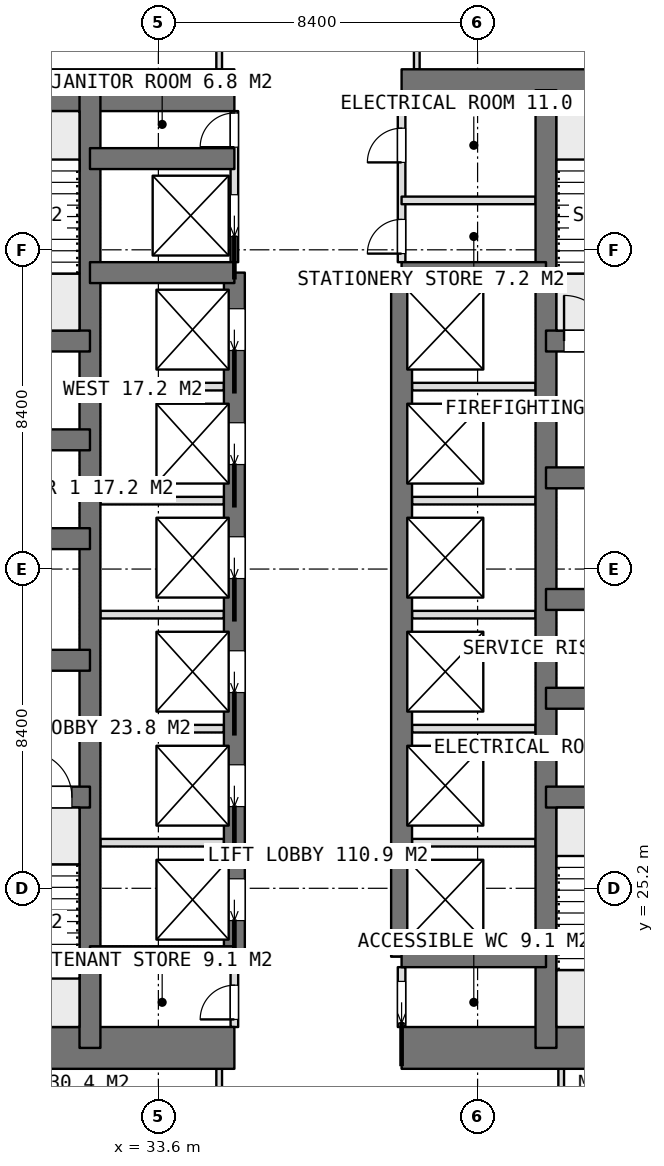
"""IFC4 building model, lengths in metres.
Left out: names, types, materials, properties, quantities, classifications, styles, units other than length and angle.
Written with IfcOpenShell. Run it as: python <this file> out.ifc"""

import sys

from ifc_helpers import new_model, si_unit, direction, frame, frame_2d, origin, place, context, subcontext, project, spatial, rectangle, extrude, element, fill, save


model = new_model("IFC4")
c1 = context("Model", 3, precision=1e-05, world=origin(), true_north=direction((0.0, 1.0)))
c2 = subcontext(c1, "Body", "Model", "MODEL_VIEW")
j1 = project(units=[si_unit("LENGTHUNIT", "METRE"), si_unit("PLANEANGLEUNIT", "RADIAN")], contexts=[c1])
p1 = place(None, origin())
s1 = spatial("IfcSite", under=j1, at=p1, CompositionType="ELEMENT")
p2 = place(p1, origin())
s2 = spatial("IfcBuilding", under=s1, at=p2, CompositionType="ELEMENT")
p3 = place(p2, frame((0.0, 0.0, 47.9)))
s3 = spatial("IfcBuildingStorey", under=s2, at=p3, CompositionType="ELEMENT", Elevation=47.9)
p4 = place(p3, frame((25.2, 21.0, 0.0), z_axis=(0.0, 0.0, 1.0), x_axis=(1.0, 0.0, 0.0)))
e1 = element("IfcWall", 1, at=p4, inside=s3, PredefinedType="SHEAR", context=c2, shape_type="SweptSolid", body=[
    extrude(rectangle(XDim=10.4, YDim=1.1, at=frame_2d((5.2, 0.0))), origin(), (0.0, 0.0, 1.0), 3.75),
])
p5 = place(p3, frame((40.0, 21.0, 0.0), z_axis=(0.0, 0.0, 1.0), x_axis=(1.0, 0.0, 0.0)))
e2 = element("IfcWall", 2, at=p5, inside=s3, PredefinedType="SHEAR", context=c2, shape_type="SweptSolid", body=[
    extrude(rectangle(XDim=10.4, YDim=1.1, at=frame_2d((5.2, 0.0))), origin(), (0.0, 0.0, 1.0), 3.75),
])
p6 = place(p3, frame((25.2, 46.2, 0.0), z_axis=(0.0, 0.0, 1.0), x_axis=(1.0, 0.0, 0.0)))
e3 = element("IfcWall", 3, at=p6, inside=s3, PredefinedType="SHEAR", context=c2, shape_type="SweptSolid", body=[
    extrude(rectangle(XDim=10.4, YDim=1.1, at=frame_2d((5.2, 0.0))), origin(), (0.0, 0.0, 1.0), 3.75),
])
p7 = place(p3, frame((40.0, 46.2, 0.0), z_axis=(0.0, 0.0, 1.0), x_axis=(1.0, 0.0, 0.0)))
e4 = element("IfcWall", 4, at=p7, inside=s3, PredefinedType="SHEAR", context=c2, shape_type="SweptSolid", body=[
    extrude(rectangle(XDim=10.4, YDim=1.1, at=frame_2d((5.2, 0.0))), origin(), (0.0, 0.0, 1.0), 3.75),
])
for number, where, z_axis, x_axis in (
    (5, (31.8, 21.0, 0.0), (0.0, 0.0, 1.0), (0.0, 1.0, 0.0)),
    (6, (43.8, 21.0, 0.0), (0.0, 0.0, 1.0), (0.0, 1.0, 0.0)),
):
    element("IfcWall", number, at=place(p3, frame(where, z_axis=z_axis, x_axis=x_axis)), inside=s3, PredefinedType="SHEAR", context=c2, shape_type="SweptSolid", body=[
        extrude(rectangle(XDim=25.2, YDim=0.55, at=frame_2d((12.6, 0.0))), origin(), (0.0, 0.0, 1.0), 3.75),
    ])
p8 = place(p3, frame((35.6, 23.4, 0.0), z_axis=(0.0, 0.0, 1.0), x_axis=(0.0, 1.0, 0.0)))
e7 = element("IfcWall", 7, at=p8, inside=s3, PredefinedType="SHEAR", context=c2, shape_type="SweptSolid", body=[
    extrude(rectangle(XDim=18.0, YDim=0.55, at=frame_2d((9.0, 0.0))), origin(), (0.0, 0.0, 1.0), 3.75),
])
p9 = place(p8, frame((0.95, 0.0, 0.0)))
e8 = element("IfcOpeningElement", 8, at=p9, cuts=e7, PredefinedType="OPENING", context=c2, shape_type="SweptSolid", body=[
    extrude(rectangle(XDim=1.1, YDim=2.1, at=frame_2d((0.55, 1.05))), frame((0.0, 0.285, 0.0), z_axis=(0.0, -1.0, 0.0), x_axis=(1.0, 0.0, 0.0)), (0.0, 0.0, 1.0), 0.57),
])
p10 = place(p8, frame((3.95, 0.0, 0.0)))
e9 = element("IfcOpeningElement", 9, at=p10, cuts=e7, PredefinedType="OPENING", context=c2, shape_type="SweptSolid", body=[
    extrude(rectangle(XDim=1.1, YDim=2.1, at=frame_2d((0.55, 1.05))), frame((0.0, 0.285, 0.0), z_axis=(0.0, -1.0, 0.0), x_axis=(1.0, 0.0, 0.0)), (0.0, 0.0, 1.0), 0.57),
])
p11 = place(p8, frame((6.95, 0.0, 0.0)))
e10 = element("IfcOpeningElement", 10, at=p11, cuts=e7, PredefinedType="OPENING", context=c2, shape_type="SweptSolid", body=[
    extrude(rectangle(XDim=1.1, YDim=2.1, at=frame_2d((0.55, 1.05))), frame((0.0, 0.285, 0.0), z_axis=(0.0, -1.0, 0.0), x_axis=(1.0, 0.0, 0.0)), (0.0, 0.0, 1.0), 0.57),
])
p12 = place(p8, frame((9.95, 0.0, 0.0)))
e11 = element("IfcOpeningElement", 11, at=p12, cuts=e7, PredefinedType="OPENING", context=c2, shape_type="SweptSolid", body=[
    extrude(rectangle(XDim=1.1, YDim=2.1, at=frame_2d((0.55, 1.05))), frame((0.0, 0.285, 0.0), z_axis=(0.0, -1.0, 0.0), x_axis=(1.0, 0.0, 0.0)), (0.0, 0.0, 1.0), 0.57),
])
p13 = place(p8, frame((12.95, 0.0, 0.0)))
e12 = element("IfcOpeningElement", 12, at=p13, cuts=e7, PredefinedType="OPENING", context=c2, shape_type="SweptSolid", body=[
    extrude(rectangle(XDim=1.1, YDim=2.1, at=frame_2d((0.55, 1.05))), frame((0.0, 0.285, 0.0), z_axis=(0.0, -1.0, 0.0), x_axis=(1.0, 0.0, 0.0)), (0.0, 0.0, 1.0), 0.57),
])
p14 = place(p8, frame((15.95, 0.0, 0.0)))
e13 = element("IfcOpeningElement", 13, at=p14, cuts=e7, PredefinedType="OPENING", context=c2, shape_type="SweptSolid", body=[
    extrude(rectangle(XDim=1.1, YDim=2.1, at=frame_2d((0.55, 1.05))), frame((0.0, 0.285, 0.0), z_axis=(0.0, -1.0, 0.0), x_axis=(1.0, 0.0, 0.0)), (0.0, 0.0, 1.0), 0.57),
])
p15 = place(p3, frame((40.0, 23.4, 0.0), z_axis=(0.0, 0.0, 1.0), x_axis=(0.0, 1.0, 0.0)))
e14 = element("IfcWall", 14, at=p15, inside=s3, PredefinedType="SHEAR", context=c2, shape_type="SweptSolid", body=[
    extrude(rectangle(XDim=18.0, YDim=0.55, at=frame_2d((9.0, 0.0))), origin(), (0.0, 0.0, 1.0), 3.75),
])
for number, where, z_axis, x_axis in (
    (15, (31.8, 23.4, 0.0), (0.0, 0.0, 1.0), (1.0, 0.0, 0.0)),
    (16, (31.8, 41.4, 0.0), (0.0, 0.0, 1.0), (1.0, 0.0, 0.0)),
    (17, (31.8, 44.4, 0.0), (0.0, 0.0, 1.0), (1.0, 0.0, 0.0)),
    (18, (40.0, 23.4, 0.0), (0.0, 0.0, 1.0), (1.0, 0.0, 0.0)),
    (19, (40.0, 41.4, 0.0), (0.0, 0.0, 1.0), (1.0, 0.0, 0.0)),
):
    element("IfcWall", number, at=place(p3, frame(where, z_axis=z_axis, x_axis=x_axis)), inside=s3, PredefinedType="SHEAR", context=c2, shape_type="SweptSolid", body=[
        extrude(rectangle(XDim=3.8, YDim=0.55, at=frame_2d((1.9, 0.0))), origin(), (0.0, 0.0, 1.0), 3.75),
    ])
p16 = place(p3, frame((25.2, 27.6, 0.0), z_axis=(0.0, 0.0, 1.0), x_axis=(1.0, 0.0, 0.0)))
e20 = element("IfcWall", 20, at=p16, inside=s3, PredefinedType="SHEAR", context=c2, shape_type="SweptSolid", body=[
    extrude(rectangle(XDim=6.6, YDim=0.55, at=frame_2d((3.3, 0.0))), origin(), (0.0, 0.0, 1.0), 3.75),
])
p17 = place(p16, frame((4.925, 0.0, 0.0)))
e21 = element("IfcOpeningElement", 21, at=p17, cuts=e20, PredefinedType="OPENING", context=c2, shape_type="SweptSolid", body=[
    extrude(rectangle(XDim=1.2, YDim=2.1, at=frame_2d((0.6, 1.05))), frame((0.0, 0.285, 0.0), z_axis=(0.0, -1.0, 0.0), x_axis=(1.0, 0.0, 0.0)), (0.0, 0.0, 1.0), 0.57),
])
p18 = place(p3, frame((25.2, 31.2, 0.0), z_axis=(0.0, 0.0, 1.0), x_axis=(1.0, 0.0, 0.0)))
e22 = element("IfcWall", 22, at=p18, inside=s3, PredefinedType="SHEAR", context=c2, shape_type="SweptSolid", body=[
    extrude(rectangle(XDim=6.6, YDim=0.55, at=frame_2d((3.3, 0.0))), origin(), (0.0, 0.0, 1.0), 3.75),
])
p19 = place(p18, frame((2.65, 0.0, 0.0)))
e23 = element("IfcOpeningElement", 23, at=p19, cuts=e22, PredefinedType="OPENING", context=c2, shape_type="SweptSolid", body=[
    extrude(rectangle(XDim=1.3, YDim=2.1, at=frame_2d((0.65, 1.05))), frame((0.0, 0.285, 0.0), z_axis=(0.0, -1.0, 0.0), x_axis=(1.0, 0.0, 0.0)), (0.0, 0.0, 1.0), 0.57),
])
for number, where, z_axis, x_axis in (
    (24, (25.2, 34.4, 0.0), (0.0, 0.0, 1.0), (1.0, 0.0, 0.0)),
    (25, (25.2, 37.0, 0.0), (0.0, 0.0, 1.0), (1.0, 0.0, 0.0)),
    (26, (25.2, 39.6, 0.0), (0.0, 0.0, 1.0), (1.0, 0.0, 0.0)),
):
    element("IfcWall", number, at=place(p3, frame(where, z_axis=z_axis, x_axis=x_axis)), inside=s3, PredefinedType="SHEAR", context=c2, shape_type="SweptSolid", body=[
        extrude(rectangle(XDim=6.6, YDim=0.55, at=frame_2d((3.3, 0.0))), origin(), (0.0, 0.0, 1.0), 3.75),
    ])
for number, where, z_axis, x_axis in (
    (27, (43.8, 27.6, 0.0), (0.0, 0.0, 1.0), (1.0, 0.0, 0.0)),
    (28, (43.8, 30.2, 0.0), (0.0, 0.0, 1.0), (1.0, 0.0, 0.0)),
    (29, (43.8, 32.8, 0.0), (0.0, 0.0, 1.0), (1.0, 0.0, 0.0)),
):
    element("IfcWall", number, at=place(p3, frame(where, z_axis=z_axis, x_axis=x_axis)), inside=s3, PredefinedType="SHEAR", context=c2, shape_type="SweptSolid", body=[
        extrude(rectangle(XDim=6.6, YDim=0.55, at=frame_2d((3.3, 0.0))), origin(), (0.0, 0.0, 1.0), 3.75),
    ])
p20 = place(p3, frame((43.8, 36.0, 0.0), z_axis=(0.0, 0.0, 1.0), x_axis=(1.0, 0.0, 0.0)))
e30 = element("IfcWall", 30, at=p20, inside=s3, PredefinedType="SHEAR", context=c2, shape_type="SweptSolid", body=[
    extrude(rectangle(XDim=6.6, YDim=0.55, at=frame_2d((3.3, 0.0))), origin(), (0.0, 0.0, 1.0), 3.75),
])
p21 = place(p20, frame((2.65, 0.0, 0.0)))
e31 = element("IfcOpeningElement", 31, at=p21, cuts=e30, PredefinedType="OPENING", context=c2, shape_type="SweptSolid", body=[
    extrude(rectangle(XDim=1.3, YDim=2.1, at=frame_2d((0.65, 1.05))), frame((0.0, 0.285, 0.0), z_axis=(0.0, -1.0, 0.0), x_axis=(1.0, 0.0, 0.0)), (0.0, 0.0, 1.0), 0.57),
])
p22 = place(p3, frame((43.8, 39.6, 0.0), z_axis=(0.0, 0.0, 1.0), x_axis=(1.0, 0.0, 0.0)))
e32 = element("IfcWall", 32, at=p22, inside=s3, PredefinedType="SHEAR", context=c2, shape_type="SweptSolid", body=[
    extrude(rectangle(XDim=6.6, YDim=0.55, at=frame_2d((3.3, 0.0))), origin(), (0.0, 0.0, 1.0), 3.75),
])
p23 = place(p22, frame((0.475, 0.0, 0.0)))
e33 = element("IfcOpeningElement", 33, at=p23, cuts=e32, PredefinedType="OPENING", context=c2, shape_type="SweptSolid", body=[
    extrude(rectangle(XDim=1.2, YDim=2.1, at=frame_2d((0.6, 1.05))), frame((0.0, 0.285, 0.0), z_axis=(0.0, -1.0, 0.0), x_axis=(1.0, 0.0, 0.0)), (0.0, 0.0, 1.0), 0.57),
])
for number, where, z_axis, x_axis in (
    (34, (32.075, 26.4, 0.0), (0.0, 0.0, 1.0), (1.0, 0.0, 0.0)),
    (35, (32.075, 29.4, 0.0), (0.0, 0.0, 1.0), (1.0, 0.0, 0.0)),
    (36, (32.075, 32.4, 0.0), (0.0, 0.0, 1.0), (1.0, 0.0, 0.0)),
    (37, (32.075, 35.4, 0.0), (0.0, 0.0, 1.0), (1.0, 0.0, 0.0)),
    (38, (32.075, 38.4, 0.0), (0.0, 0.0, 1.0), (1.0, 0.0, 0.0)),
    (39, (40.275, 26.4, 0.0), (0.0, 0.0, 1.0), (1.0, 0.0, 0.0)),
    (40, (40.275, 29.4, 0.0), (0.0, 0.0, 1.0), (1.0, 0.0, 0.0)),
    (41, (40.275, 32.4, 0.0), (0.0, 0.0, 1.0), (1.0, 0.0, 0.0)),
    (42, (40.275, 35.4, 0.0), (0.0, 0.0, 1.0), (1.0, 0.0, 0.0)),
    (43, (40.275, 38.4, 0.0), (0.0, 0.0, 1.0), (1.0, 0.0, 0.0)),
):
    element("IfcWall", number, at=place(p3, frame(where, z_axis=z_axis, x_axis=x_axis)), inside=s3, PredefinedType="PARTITIONING", context=c2, shape_type="SweptSolid", body=[
        extrude(rectangle(XDim=3.25, YDim=0.2, at=frame_2d((1.625, 0.0))), origin(), (0.0, 0.0, 1.0), 3.5),
    ])
p24 = place(p3, frame((40.0, 21.55, 0.0), z_axis=(0.0, 0.0, 1.0), x_axis=(0.0, 1.0, 0.0)))
e44 = element("IfcWall", 44, at=p24, inside=s3, PredefinedType="PARTITIONING", context=c2, shape_type="SweptSolid", body=[
    extrude(rectangle(XDim=1.575, YDim=0.2, at=frame_2d((0.788, 0.0))), origin(), (0.0, 0.0, 1.0), 3.5),
])
p25 = place(p24, frame((0.1, 0.0, 0.0)))
e45 = element("IfcOpeningElement", 45, at=p25, cuts=e44, PredefinedType="OPENING", context=c2, shape_type="SweptSolid", body=[
    extrude(rectangle(XDim=1.1, YDim=2.1, at=frame_2d((0.55, 1.05))), frame((0.0, 0.11, 0.0), z_axis=(0.0, -1.0, 0.0), x_axis=(1.0, 0.0, 0.0)), (0.0, 0.0, 1.0), 0.22),
])
p26 = place(p3, frame((40.0, 41.675, 0.0), z_axis=(0.0, 0.0, 1.0), x_axis=(0.0, 1.0, 0.0)))
e46 = element("IfcWall", 46, at=p26, inside=s3, PredefinedType="PARTITIONING", context=c2, shape_type="SweptSolid", body=[
    extrude(rectangle(XDim=3.975, YDim=0.2, at=frame_2d((1.987, 0.0))), origin(), (0.0, 0.0, 1.0), 3.5),
])
p27 = place(p26, frame((2.625, 0.0, 0.0)))
e47 = element("IfcOpeningElement", 47, at=p27, cuts=e46, PredefinedType="OPENING", context=c2, shape_type="SweptSolid", body=[
    extrude(rectangle(XDim=0.9, YDim=2.1, at=frame_2d((0.45, 1.05))), frame((0.0, 0.11, 0.0), z_axis=(0.0, -1.0, 0.0), x_axis=(1.0, 0.0, 0.0)), (0.0, 0.0, 1.0), 0.22),
])
p28 = place(p26, frame((0.225, 0.0, 0.0)))
e48 = element("IfcOpeningElement", 48, at=p28, cuts=e46, PredefinedType="OPENING", context=c2, shape_type="SweptSolid", body=[
    extrude(rectangle(XDim=0.9, YDim=2.1, at=frame_2d((0.45, 1.05))), frame((0.0, 0.11, 0.0), z_axis=(0.0, -1.0, 0.0), x_axis=(1.0, 0.0, 0.0)), (0.0, 0.0, 1.0), 0.22),
])
p29 = place(p3, frame((35.6, 41.675, 0.0), z_axis=(0.0, 0.0, 1.0), x_axis=(0.0, 1.0, 0.0)))
e49 = element("IfcWall", 49, at=p29, inside=s3, PredefinedType="PARTITIONING", context=c2, shape_type="SweptSolid", body=[
    extrude(rectangle(XDim=3.975, YDim=0.2, at=frame_2d((1.987, 0.0))), origin(), (0.0, 0.0, 1.0), 3.5),
])
p30 = place(p29, frame((3.025, 0.0, 0.0)))
e50 = element("IfcOpeningElement", 50, at=p30, cuts=e49, PredefinedType="OPENING", context=c2, shape_type="SweptSolid", body=[
    extrude(rectangle(XDim=0.9, YDim=2.1, at=frame_2d((0.45, 1.05))), frame((0.0, 0.11, 0.0), z_axis=(0.0, -1.0, 0.0), x_axis=(1.0, 0.0, 0.0)), (0.0, 0.0, 1.0), 0.22),
])
p31 = place(p29, frame((0.675, 0.0, 0.0)))
e51 = element("IfcOpeningElement", 51, at=p31, cuts=e49, PredefinedType="OPENING", context=c2, shape_type="SweptSolid", body=[
    extrude(rectangle(XDim=1.1, YDim=2.1, at=frame_2d((0.55, 1.05))), frame((0.0, 0.11, 0.0), z_axis=(0.0, -1.0, 0.0), x_axis=(1.0, 0.0, 0.0)), (0.0, 0.0, 1.0), 0.22),
])
p32 = place(p3, frame((35.6, 21.55, 0.0), z_axis=(0.0, 0.0, 1.0), x_axis=(0.0, 1.0, 0.0)))
e52 = element("IfcWall", 52, at=p32, inside=s3, PredefinedType="PARTITIONING", context=c2, shape_type="SweptSolid", body=[
    extrude(rectangle(XDim=1.575, YDim=0.2, at=frame_2d((0.788, 0.0))), origin(), (0.0, 0.0, 1.0), 3.5),
])
p33 = place(p32, frame((0.2, 0.0, 0.0)))
e53 = element("IfcOpeningElement", 53, at=p33, cuts=e52, PredefinedType="OPENING", context=c2, shape_type="SweptSolid", body=[
    extrude(rectangle(XDim=0.9, YDim=2.1, at=frame_2d((0.45, 1.05))), frame((0.0, 0.11, 0.0), z_axis=(0.0, -1.0, 0.0), x_axis=(1.0, 0.0, 0.0)), (0.0, 0.0, 1.0), 0.22),
])
p34 = place(p3, frame((40.0, 43.3, 0.0), z_axis=(0.0, 0.0, 1.0), x_axis=(1.0, 0.0, 0.0)))
e54 = element("IfcWall", 54, at=p34, inside=s3, PredefinedType="PARTITIONING", context=c2, shape_type="SweptSolid", body=[
    extrude(rectangle(XDim=3.525, YDim=0.2, at=frame_2d((1.762, 0.0))), origin(), (0.0, 0.0, 1.0), 3.5),
])
for number, where, z_axis, x_axis in (
    (55, (40.4, 46.75, 0.0), (0.0, 0.0, 1.0), (0.0, 1.0, 0.0)),
    (56, (35.2, 46.75, 0.0), (0.0, 0.0, 1.0), (0.0, 1.0, 0.0)),
    (57, (35.2, 17.875, 0.0), (0.0, 0.0, 1.0), (0.0, 1.0, 0.0)),
    (58, (44.2, 17.875, 0.0), (0.0, 0.0, 1.0), (0.0, 1.0, 0.0)),
):
    element("IfcWall", number, at=place(p3, frame(where, z_axis=z_axis, x_axis=x_axis)), inside=s3, PredefinedType="PARTITIONING", context=c2, shape_type="SweptSolid", body=[
        extrude(rectangle(XDim=2.575, YDim=0.15, at=frame_2d((1.288, 0.0))), origin(), (0.0, 0.0, 1.0), 3.5),
    ])
p35 = place(p25, origin())
e59 = element("IfcDoor", 59, at=p35, inside=s3, OperationType="SLIDING_TO_LEFT", PredefinedType="DOOR", context=c2, shape_type="SweptSolid", body=[
    extrude(rectangle(XDim=1.1, YDim=2.1, at=frame_2d((0.55, 1.05))), frame((0.0, 0.025, 0.0), z_axis=(0.0, -1.0, 0.0), x_axis=(1.0, 0.0, 0.0)), (0.0, 0.0, 1.0), 0.05),
])
fill(e45, e59)
p36 = place(p33, origin())
e60 = element("IfcDoor", 60, at=p36, inside=s3, OperationType="SINGLE_SWING_LEFT", PredefinedType="DOOR", context=c2, shape_type="SweptSolid", body=[
    extrude(rectangle(XDim=0.9, YDim=2.1, at=frame_2d((0.45, 1.05))), frame((0.0, 0.025, 0.0), z_axis=(0.0, -1.0, 0.0), x_axis=(1.0, 0.0, 0.0)), (0.0, 0.0, 1.0), 0.05),
])
fill(e53, e60)
p37 = place(p27, origin())
e61 = element("IfcDoor", 61, at=p37, inside=s3, OperationType="SINGLE_SWING_LEFT", PredefinedType="DOOR", context=c2, shape_type="SweptSolid", body=[
    extrude(rectangle(XDim=0.9, YDim=2.1, at=frame_2d((0.45, 1.05))), frame((0.0, 0.025, 0.0), z_axis=(0.0, -1.0, 0.0), x_axis=(1.0, 0.0, 0.0)), (0.0, 0.0, 1.0), 0.05),
])
fill(e47, e61)
p38 = place(p28, origin())
e62 = element("IfcDoor", 62, at=p38, inside=s3, OperationType="SINGLE_SWING_LEFT", PredefinedType="DOOR", context=c2, shape_type="SweptSolid", body=[
    extrude(rectangle(XDim=0.9, YDim=2.1, at=frame_2d((0.45, 1.05))), frame((0.0, 0.025, 0.0), z_axis=(0.0, -1.0, 0.0), x_axis=(1.0, 0.0, 0.0)), (0.0, 0.0, 1.0), 0.05),
])
fill(e48, e62)
p39 = place(p30, origin())
e63 = element("IfcDoor", 63, at=p39, inside=s3, OperationType="SINGLE_SWING_LEFT", PredefinedType="DOOR", context=c2, shape_type="SweptSolid", body=[
    extrude(rectangle(XDim=0.9, YDim=2.1, at=frame_2d((0.45, 1.05))), frame((0.0, 0.025, 0.0), z_axis=(0.0, -1.0, 0.0), x_axis=(1.0, 0.0, 0.0)), (0.0, 0.0, 1.0), 0.05),
])
fill(e50, e63)
p40 = place(p9, origin())
e64 = element("IfcDoor", 64, at=p40, inside=s3, OperationType="SLIDING_TO_LEFT", PredefinedType="USERDEFINED", context=c2, shape_type="SweptSolid", body=[
    extrude(rectangle(XDim=1.1, YDim=2.1, at=frame_2d((0.55, 1.05))), frame((0.0, 0.025, 0.0), z_axis=(0.0, -1.0, 0.0), x_axis=(1.0, 0.0, 0.0)), (0.0, 0.0, 1.0), 0.05),
])
fill(e8, e64)
p41 = place(p10, origin())
e65 = element("IfcDoor", 65, at=p41, inside=s3, OperationType="SLIDING_TO_LEFT", PredefinedType="USERDEFINED", context=c2, shape_type="SweptSolid", body=[
    extrude(rectangle(XDim=1.1, YDim=2.1, at=frame_2d((0.55, 1.05))), frame((0.0, 0.025, 0.0), z_axis=(0.0, -1.0, 0.0), x_axis=(1.0, 0.0, 0.0)), (0.0, 0.0, 1.0), 0.05),
])
fill(e9, e65)
p42 = place(p11, origin())
e66 = element("IfcDoor", 66, at=p42, inside=s3, OperationType="SLIDING_TO_LEFT", PredefinedType="USERDEFINED", context=c2, shape_type="SweptSolid", body=[
    extrude(rectangle(XDim=1.1, YDim=2.1, at=frame_2d((0.55, 1.05))), frame((0.0, 0.025, 0.0), z_axis=(0.0, -1.0, 0.0), x_axis=(1.0, 0.0, 0.0)), (0.0, 0.0, 1.0), 0.05),
])
fill(e10, e66)
p43 = place(p12, origin())
e67 = element("IfcDoor", 67, at=p43, inside=s3, OperationType="SLIDING_TO_LEFT", PredefinedType="USERDEFINED", context=c2, shape_type="SweptSolid", body=[
    extrude(rectangle(XDim=1.1, YDim=2.1, at=frame_2d((0.55, 1.05))), frame((0.0, 0.025, 0.0), z_axis=(0.0, -1.0, 0.0), x_axis=(1.0, 0.0, 0.0)), (0.0, 0.0, 1.0), 0.05),
])
fill(e11, e67)
p44 = place(p13, origin())
e68 = element("IfcDoor", 68, at=p44, inside=s3, OperationType="SLIDING_TO_LEFT", PredefinedType="USERDEFINED", context=c2, shape_type="SweptSolid", body=[
    extrude(rectangle(XDim=1.1, YDim=2.1, at=frame_2d((0.55, 1.05))), frame((0.0, 0.025, 0.0), z_axis=(0.0, -1.0, 0.0), x_axis=(1.0, 0.0, 0.0)), (0.0, 0.0, 1.0), 0.05),
])
fill(e12, e68)
p45 = place(p14, origin())
e69 = element("IfcDoor", 69, at=p45, inside=s3, OperationType="SLIDING_TO_LEFT", PredefinedType="USERDEFINED", context=c2, shape_type="SweptSolid", body=[
    extrude(rectangle(XDim=1.1, YDim=2.1, at=frame_2d((0.55, 1.05))), frame((0.0, 0.025, 0.0), z_axis=(0.0, -1.0, 0.0), x_axis=(1.0, 0.0, 0.0)), (0.0, 0.0, 1.0), 0.05),
])
fill(e13, e69)
p46 = place(p31, origin())
e70 = element("IfcDoor", 70, at=p46, inside=s3, OperationType="SLIDING_TO_LEFT", PredefinedType="USERDEFINED", context=c2, shape_type="SweptSolid", body=[
    extrude(rectangle(XDim=1.1, YDim=2.1, at=frame_2d((0.55, 1.05))), frame((0.0, 0.025, 0.0), z_axis=(0.0, -1.0, 0.0), x_axis=(1.0, 0.0, 0.0)), (0.0, 0.0, 1.0), 0.05),
])
fill(e51, e70)
p47 = place(p17, origin())
e71 = element("IfcDoor", 71, at=p47, inside=s3, OperationType="SINGLE_SWING_RIGHT", PredefinedType="DOOR", context=c2, shape_type="SweptSolid", body=[
    extrude(rectangle(XDim=1.2, YDim=2.1, at=frame_2d((0.6, 1.05))), frame((0.0, 0.025, 0.0), z_axis=(0.0, -1.0, 0.0), x_axis=(1.0, 0.0, 0.0)), (0.0, 0.0, 1.0), 0.05),
])
fill(e21, e71)
p48 = place(p23, origin())
e72 = element("IfcDoor", 72, at=p48, inside=s3, OperationType="SINGLE_SWING_RIGHT", PredefinedType="DOOR", context=c2, shape_type="SweptSolid", body=[
    extrude(rectangle(XDim=1.2, YDim=2.1, at=frame_2d((0.6, 1.05))), frame((0.0, 0.025, 0.0), z_axis=(0.0, -1.0, 0.0), x_axis=(1.0, 0.0, 0.0)), (0.0, 0.0, 1.0), 0.05),
])
fill(e33, e72)
save(model, sys.argv[1])
